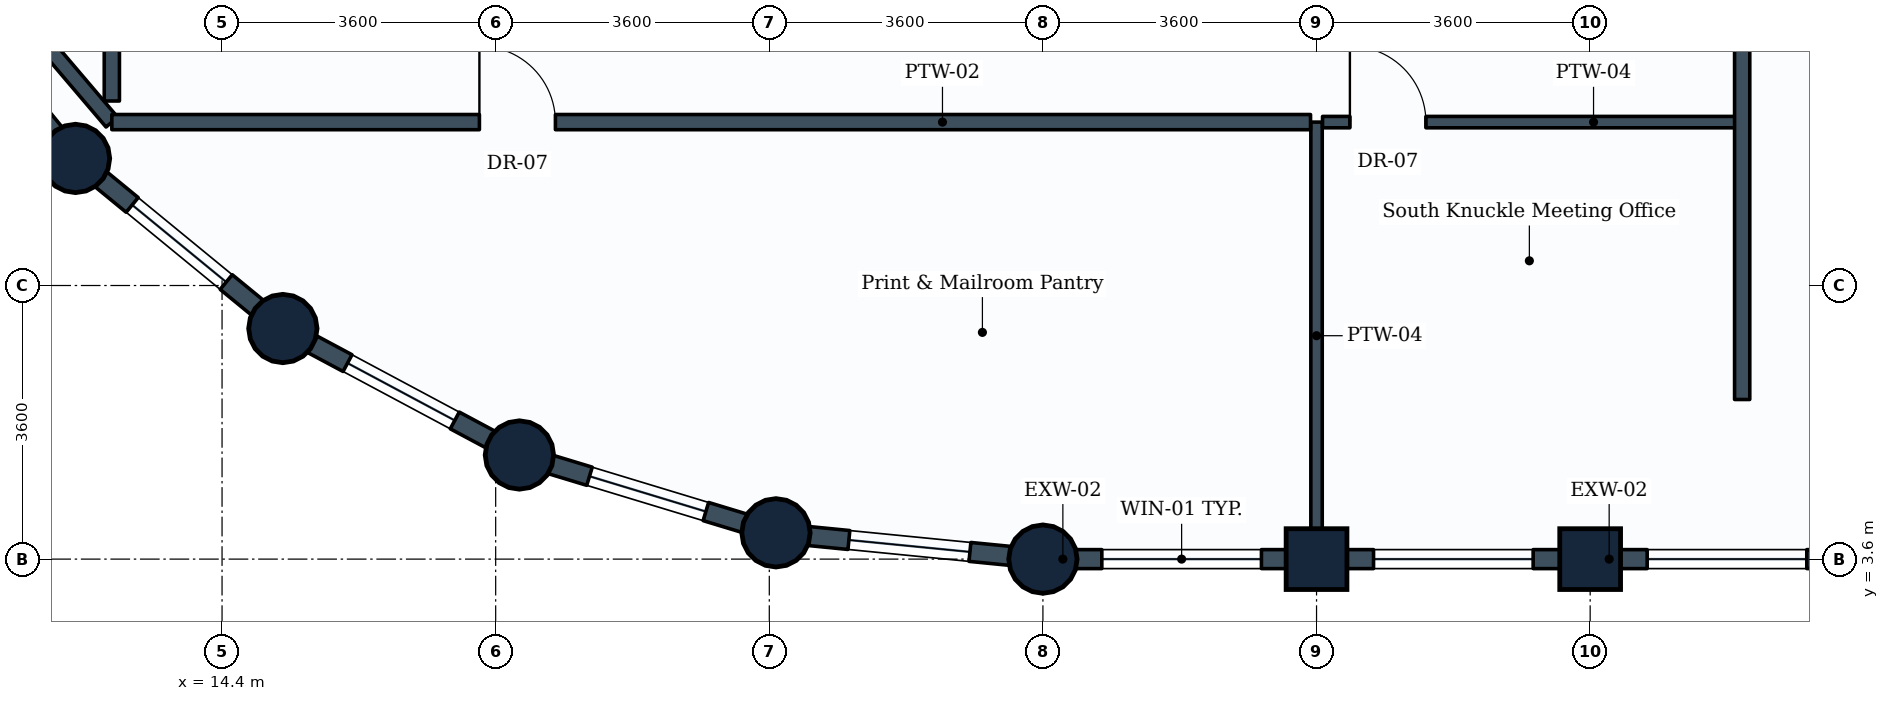
"""IFC4 building model, lengths in metres.
Left out: names, types, materials, properties, quantities, classifications, styles, units other than length and angle.
Written with IfcOpenShell. Run it as: python <this file> out.ifc"""

import sys

from ifc_helpers import new_model, si_unit, direction, frame, frame_2d, origin, origin_2d, place, context, subcontext, project, spatial, rectangle, circle, extrude, element, fill, save


model = new_model("IFC4")
c1 = context("Model", 3, precision=1e-05, world=origin(), true_north=direction((0.0, 1.0)))
c2 = subcontext(c1, "Body", "Model", "MODEL_VIEW")
j1 = project(units=[si_unit("LENGTHUNIT", "METRE"), si_unit("PLANEANGLEUNIT", "RADIAN")], contexts=[c1])
p1 = place(None, origin())
s1 = spatial("IfcSite", under=j1, at=p1, CompositionType="ELEMENT")
p2 = place(p1, origin())
s2 = spatial("IfcBuilding", under=s1, at=p2, CompositionType="ELEMENT")
p3 = place(p2, frame((0.0, 0.0, 277.4)))
s3 = spatial("IfcBuildingStorey", under=s2, at=p3, CompositionType="ELEMENT", Elevation=277.4)
for number, where, z_axis, x_axis in (
    (1, (12.472, 8.872, 0.0), (0.0, 0.0, 1.0), (1.0, 0.0, 0.0)),
    (2, (15.2, 6.634, 0.0), (0.0, 0.0, 1.0), (1.0, 0.0, 0.0)),
    (3, (18.312, 4.97, 0.0), (0.0, 0.0, 1.0), (1.0, 0.0, 0.0)),
    (4, (21.688, 3.946, 0.0), (0.0, 0.0, 1.0), (1.0, 0.0, 0.0)),
    (5, (25.2, 3.6, 0.0), (0.0, 0.0, 1.0), (1.0, 0.0, 0.0)),
):
    element("IfcColumn", number, at=place(p3, frame(where, z_axis=z_axis, x_axis=x_axis)), inside=s3, PredefinedType="COLUMN", context=c2, shape_type="SweptSolid", body=[
        extrude(circle(Radius=0.45, at=origin_2d()), origin(), (0.0, 0.0, 1.0), 3.6),
    ])
for number, where, z_axis, x_axis in (
    (6, (28.8, 3.6, 0.0), (0.0, 0.0, 1.0), (1.0, 0.0, 0.0)),
    (7, (32.4, 3.6, 0.0), (0.0, 0.0, 1.0), (1.0, 0.0, 0.0)),
):
    element("IfcColumn", number, at=place(p3, frame(where, z_axis=z_axis, x_axis=x_axis)), inside=s3, PredefinedType="COLUMN", context=c2, shape_type="SweptSolid", body=[
        extrude(rectangle(XDim=0.8, YDim=0.8, at=origin_2d()), origin(), (0.0, 0.0, 1.0), 3.6),
    ])
p4 = place(p3, frame((28.8, 3.6, 0.0), z_axis=(0.0, 0.0, 1.0), x_axis=(-1.0, 0.0, 0.0)))
e8 = element("IfcWall", 8, at=p4, inside=s3, PredefinedType="STANDARD", context=c2, shape_type="SweptSolid", body=[
    extrude(rectangle(XDim=3.6, YDim=0.25, at=frame_2d((1.8, 0.0))), origin(), (0.0, 0.0, 1.0), 2.83),
])
p5 = place(p4, frame((0.725, 0.0, 0.85)))
e9 = element("IfcOpeningElement", 9, at=p5, cuts=e8, PredefinedType="OPENING", context=c2, shape_type="SweptSolid", body=[
    extrude(rectangle(XDim=2.1, YDim=1.35, at=frame_2d((1.05, 0.675))), frame((0.0, 0.135, 0.0), z_axis=(0.0, -1.0, 0.0), x_axis=(1.0, 0.0, 0.0)), (0.0, 0.0, 1.0), 0.27),
])
p6 = place(p3, frame((32.4, 3.6, 0.0), z_axis=(0.0, 0.0, 1.0), x_axis=(-1.0, 0.0, 0.0)))
e10 = element("IfcWall", 10, at=p6, inside=s3, PredefinedType="STANDARD", context=c2, shape_type="SweptSolid", body=[
    extrude(rectangle(XDim=3.6, YDim=0.25, at=frame_2d((1.8, 0.0))), origin(), (0.0, 0.0, 1.0), 2.83),
])
p7 = place(p6, frame((0.75, 0.0, 0.85)))
e11 = element("IfcOpeningElement", 11, at=p7, cuts=e10, PredefinedType="OPENING", context=c2, shape_type="SweptSolid", body=[
    extrude(rectangle(XDim=2.1, YDim=1.35, at=frame_2d((1.05, 0.675))), frame((0.0, 0.135, 0.0), z_axis=(0.0, -1.0, 0.0), x_axis=(1.0, 0.0, 0.0)), (0.0, 0.0, 1.0), 0.27),
])
p8 = place(p3, frame((36.0, 3.6, 0.0), z_axis=(0.0, 0.0, 1.0), x_axis=(-1.0, 0.0, 0.0)))
e12 = element("IfcWall", 12, at=p8, inside=s3, PredefinedType="STANDARD", context=c2, shape_type="SweptSolid", body=[
    extrude(rectangle(XDim=3.6, YDim=0.25, at=frame_2d((1.8, 0.0))), origin(), (0.0, 0.0, 1.0), 2.83),
])
p9 = place(p8, frame((0.75, 0.0, 0.85)))
e13 = element("IfcOpeningElement", 13, at=p9, cuts=e12, PredefinedType="OPENING", context=c2, shape_type="SweptSolid", body=[
    extrude(rectangle(XDim=2.1, YDim=1.35, at=frame_2d((1.05, 0.675))), frame((0.0, 0.135, 0.0), z_axis=(0.0, -1.0, 0.0), x_axis=(1.0, 0.0, 0.0)), (0.0, 0.0, 1.0), 0.27),
])
p10 = place(p3, frame((12.472, 8.872, 0.0), z_axis=(0.0, 0.0, 1.0), x_axis=(-0.634258295121, 0.773121216285, 0.0)))
e14 = element("IfcWall", 14, at=p10, inside=s3, PredefinedType="STANDARD", context=c2, shape_type="SweptSolid", body=[
    extrude(rectangle(XDim=3.529, YDim=0.25, at=frame_2d((1.764, 0.0))), origin(), (0.0, 0.0, 1.0), 2.83),
])
p11 = place(p10, frame((0.964, 0.0, 0.85)))
e15 = element("IfcOpeningElement", 15, at=p11, cuts=e14, PredefinedType="OPENING", context=c2, shape_type="SweptSolid", body=[
    extrude(rectangle(XDim=1.6, YDim=1.35, at=frame_2d((0.8, 0.675))), frame((0.0, 0.135, 0.0), z_axis=(0.0, -1.0, 0.0), x_axis=(1.0, 0.0, 0.0)), (0.0, 0.0, 1.0), 0.27),
])
p12 = place(p3, frame((15.2, 6.634, 0.0), z_axis=(0.0, 0.0, 1.0), x_axis=(-0.773121216285, 0.634258295121, 0.0)))
e16 = element("IfcWall", 16, at=p12, inside=s3, PredefinedType="STANDARD", context=c2, shape_type="SweptSolid", body=[
    extrude(rectangle(XDim=3.529, YDim=0.25, at=frame_2d((1.764, 0.0))), origin(), (0.0, 0.0, 1.0), 2.83),
])
p13 = place(p12, frame((0.964, 0.0, 0.85)))
e17 = element("IfcOpeningElement", 17, at=p13, cuts=e16, PredefinedType="OPENING", context=c2, shape_type="SweptSolid", body=[
    extrude(rectangle(XDim=1.6, YDim=1.35, at=frame_2d((0.8, 0.675))), frame((0.0, 0.135, 0.0), z_axis=(0.0, -1.0, 0.0), x_axis=(1.0, 0.0, 0.0)), (0.0, 0.0, 1.0), 0.27),
])
p14 = place(p3, frame((18.312, 4.97, 0.0), z_axis=(0.0, 0.0, 1.0), x_axis=(-0.881846862014, 0.471535907389, 0.0)))
e18 = element("IfcWall", 18, at=p14, inside=s3, PredefinedType="STANDARD", context=c2, shape_type="SweptSolid", body=[
    extrude(rectangle(XDim=3.529, YDim=0.25, at=frame_2d((1.765, 0.0))), origin(), (0.0, 0.0, 1.0), 2.83),
])
p15 = place(p14, frame((0.964, 0.0, 0.85)))
e19 = element("IfcOpeningElement", 19, at=p15, cuts=e18, PredefinedType="OPENING", context=c2, shape_type="SweptSolid", body=[
    extrude(rectangle(XDim=1.6, YDim=1.35, at=frame_2d((0.8, 0.675))), frame((0.0, 0.135, 0.0), z_axis=(0.0, -1.0, 0.0), x_axis=(1.0, 0.0, 0.0)), (0.0, 0.0, 1.0), 0.27),
])
p16 = place(p3, frame((21.688, 3.946, 0.0), z_axis=(0.0, 0.0, 1.0), x_axis=(-0.956953367403, 0.290241714123, 0.0)))
e20 = element("IfcWall", 20, at=p16, inside=s3, PredefinedType="STANDARD", context=c2, shape_type="SweptSolid", body=[
    extrude(rectangle(XDim=3.528, YDim=0.25, at=frame_2d((1.764, 0.0))), origin(), (0.0, 0.0, 1.0), 2.83),
])
p17 = place(p16, frame((0.964, 0.0, 0.85)))
e21 = element("IfcOpeningElement", 21, at=p17, cuts=e20, PredefinedType="OPENING", context=c2, shape_type="SweptSolid", body=[
    extrude(rectangle(XDim=1.6, YDim=1.35, at=frame_2d((0.8, 0.675))), frame((0.0, 0.135, 0.0), z_axis=(0.0, -1.0, 0.0), x_axis=(1.0, 0.0, 0.0)), (0.0, 0.0, 1.0), 0.27),
])
p18 = place(p3, frame((25.2, 3.6, 0.0), z_axis=(0.0, 0.0, 1.0), x_axis=(-0.995183369056, 0.098030923459, 0.0)))
e22 = element("IfcWall", 22, at=p18, inside=s3, PredefinedType="STANDARD", context=c2, shape_type="SweptSolid", body=[
    extrude(rectangle(XDim=3.529, YDim=0.25, at=frame_2d((1.765, 0.0))), origin(), (0.0, 0.0, 1.0), 2.83),
])
p19 = place(p18, frame((0.965, 0.0, 0.85)))
e23 = element("IfcOpeningElement", 23, at=p19, cuts=e22, PredefinedType="OPENING", context=c2, shape_type="SweptSolid", body=[
    extrude(rectangle(XDim=1.6, YDim=1.35, at=frame_2d((0.8, 0.675))), frame((0.0, 0.135, 0.0), z_axis=(0.0, -1.0, 0.0), x_axis=(1.0, 0.0, 0.0)), (0.0, 0.0, 1.0), 0.27),
])
p20 = place(p3, frame((28.8, 9.35, 0.0), z_axis=(0.0, 0.0, 1.0), x_axis=(0.0, -1.0, 0.0)))
e24 = element("IfcWall", 24, at=p20, inside=s3, PredefinedType="PARTITIONING", context=c2, shape_type="SweptSolid", body=[
    extrude(rectangle(XDim=5.621, YDim=0.15, at=frame_2d((2.811, 0.0))), origin(), (0.0, 0.0, 1.0), 3.335),
])
p21 = place(p3, frame((12.95, 9.35, 0.0), z_axis=(0.0, 0.0, 1.0), x_axis=(-0.648016103597, 0.761626633908, 0.0)))
e25 = element("IfcWall", 25, at=p21, inside=s3, PredefinedType="PARTITIONING", context=c2, shape_type="SweptSolid", body=[
    extrude(rectangle(XDim=5.319, YDim=0.2, at=frame_2d((2.659, 0.0))), origin(), (0.0, 0.0, 1.0), 2.83),
])
p22 = place(p3, frame((12.95, 9.628, 0.0), z_axis=(0.0, 0.0, 1.0), x_axis=(0.0, 1.0, 0.0)))
e26 = element("IfcWall", 26, at=p22, inside=s3, PredefinedType="PARTITIONING", context=c2, shape_type="SweptSolid", body=[
    extrude(rectangle(XDim=6.868, YDim=0.2, at=frame_2d((3.434, 0.0))), origin(), (0.0, 0.0, 1.0), 3.03),
])
p23 = place(p22, frame((3.953, 0.0, 0.0)))
e27 = element("IfcOpeningElement", 27, at=p23, cuts=e26, PredefinedType="OPENING", context=c2, shape_type="SweptSolid", body=[
    extrude(rectangle(XDim=1.0, YDim=2.1, at=frame_2d((0.5, 1.05))), frame((0.0, 0.11, 0.0), z_axis=(0.0, -1.0, 0.0), x_axis=(1.0, 0.0, 0.0)), (0.0, 0.0, 1.0), 0.22),
])
p24 = place(p3, frame((12.95, 9.35, 0.0), z_axis=(0.0, 0.0, 1.0), x_axis=(1.0, 0.0, 0.0)))
e28 = element("IfcWall", 28, at=p24, inside=s3, PredefinedType="PARTITIONING", context=c2, shape_type="SweptSolid", body=[
    extrude(rectangle(XDim=15.771, YDim=0.2, at=frame_2d((7.885, 0.0))), origin(), (0.0, 0.0, 1.0), 3.02),
])
p25 = place(p24, frame((4.836, 0.0, 0.0)))
e29 = element("IfcOpeningElement", 29, at=p25, cuts=e28, PredefinedType="OPENING", context=c2, shape_type="SweptSolid", body=[
    extrude(rectangle(XDim=1.0, YDim=2.1, at=frame_2d((0.5, 1.05))), frame((0.0, 0.11, 0.0), z_axis=(0.0, -1.0, 0.0), x_axis=(1.0, 0.0, 0.0)), (0.0, 0.0, 1.0), 0.22),
])
p26 = place(p3, frame((28.879, 9.35, 0.0), z_axis=(0.0, 0.0, 1.0), x_axis=(1.0, 0.0, 0.0)))
e30 = element("IfcWall", 30, at=p26, inside=s3, PredefinedType="PARTITIONING", context=c2, shape_type="SweptSolid", body=[
    extrude(rectangle(XDim=5.521, YDim=0.15, at=frame_2d((2.76, 0.0))), origin(), (0.0, 0.0, 1.0), 3.335),
])
p27 = place(p26, frame((0.36, 0.0, 0.0)))
e31 = element("IfcOpeningElement", 31, at=p27, cuts=e30, PredefinedType="OPENING", context=c2, shape_type="SweptSolid", body=[
    extrude(rectangle(XDim=1.0, YDim=2.1, at=frame_2d((0.5, 1.05))), frame((0.0, 0.085, 0.0), z_axis=(0.0, -1.0, 0.0), x_axis=(1.0, 0.0, 0.0)), (0.0, 0.0, 1.0), 0.17),
])
p28 = place(p3, frame((34.4, 5.7, 0.0), z_axis=(0.0, 0.0, 1.0), x_axis=(0.0, 1.0, 0.0)))
e32 = element("IfcWall", 32, at=p28, inside=s3, PredefinedType="PARTITIONING", context=c2, shape_type="SweptSolid", body=[
    extrude(rectangle(XDim=12.15, YDim=0.2, at=frame_2d((6.075, 0.0))), origin(), (0.0, 0.0, 1.0), 3.03),
])
p29 = place(p5, origin())
e33 = element("IfcWindow", 33, at=p29, inside=s3, PartitioningType="SINGLE_PANEL", PredefinedType="WINDOW", context=c2, shape_type="SweptSolid", body=[
    extrude(rectangle(XDim=2.1, YDim=1.35, at=frame_2d((1.05, 0.675))), frame((0.0, 0.03, 0.0), z_axis=(0.0, -1.0, 0.0), x_axis=(1.0, 0.0, 0.0)), (0.0, 0.0, 1.0), 0.06),
])
fill(e9, e33)
p30 = place(p7, origin())
e34 = element("IfcWindow", 34, at=p30, inside=s3, PartitioningType="SINGLE_PANEL", PredefinedType="WINDOW", context=c2, shape_type="SweptSolid", body=[
    extrude(rectangle(XDim=2.1, YDim=1.35, at=frame_2d((1.05, 0.675))), frame((0.0, 0.03, 0.0), z_axis=(0.0, -1.0, 0.0), x_axis=(1.0, 0.0, 0.0)), (0.0, 0.0, 1.0), 0.06),
])
fill(e11, e34)
p31 = place(p9, origin())
e35 = element("IfcWindow", 35, at=p31, inside=s3, PartitioningType="SINGLE_PANEL", PredefinedType="WINDOW", context=c2, shape_type="SweptSolid", body=[
    extrude(rectangle(XDim=2.1, YDim=1.35, at=frame_2d((1.05, 0.675))), frame((0.0, 0.03, 0.0), z_axis=(0.0, -1.0, 0.0), x_axis=(1.0, 0.0, 0.0)), (0.0, 0.0, 1.0), 0.06),
])
fill(e13, e35)
p32 = place(p13, origin())
e36 = element("IfcWindow", 36, at=p32, inside=s3, PartitioningType="SINGLE_PANEL", PredefinedType="WINDOW", context=c2, shape_type="SweptSolid", body=[
    extrude(rectangle(XDim=1.6, YDim=1.35, at=frame_2d((0.8, 0.675))), frame((0.0, 0.03, 0.0), z_axis=(0.0, -1.0, 0.0), x_axis=(1.0, 0.0, 0.0)), (0.0, 0.0, 1.0), 0.06),
])
fill(e17, e36)
p33 = place(p15, origin())
e37 = element("IfcWindow", 37, at=p33, inside=s3, PartitioningType="SINGLE_PANEL", PredefinedType="WINDOW", context=c2, shape_type="SweptSolid", body=[
    extrude(rectangle(XDim=1.6, YDim=1.35, at=frame_2d((0.8, 0.675))), frame((0.0, 0.03, 0.0), z_axis=(0.0, -1.0, 0.0), x_axis=(1.0, 0.0, 0.0)), (0.0, 0.0, 1.0), 0.06),
])
fill(e19, e37)
p34 = place(p17, origin())
e38 = element("IfcWindow", 38, at=p34, inside=s3, PartitioningType="SINGLE_PANEL", PredefinedType="WINDOW", context=c2, shape_type="SweptSolid", body=[
    extrude(rectangle(XDim=1.6, YDim=1.35, at=frame_2d((0.8, 0.675))), frame((0.0, 0.03, 0.0), z_axis=(0.0, -1.0, 0.0), x_axis=(1.0, 0.0, 0.0)), (0.0, 0.0, 1.0), 0.06),
])
fill(e21, e38)
p35 = place(p19, origin())
e39 = element("IfcWindow", 39, at=p35, inside=s3, PartitioningType="SINGLE_PANEL", PredefinedType="WINDOW", context=c2, shape_type="SweptSolid", body=[
    extrude(rectangle(XDim=1.6, YDim=1.35, at=frame_2d((0.8, 0.675))), frame((0.0, 0.03, 0.0), z_axis=(0.0, -1.0, 0.0), x_axis=(1.0, 0.0, 0.0)), (0.0, 0.0, 1.0), 0.06),
])
fill(e23, e39)
p36 = place(p25, origin())
e40 = element("IfcDoor", 40, at=p36, inside=s3, OperationType="SINGLE_SWING_LEFT", PredefinedType="DOOR", context=c2, shape_type="SweptSolid", body=[
    extrude(rectangle(XDim=1.0, YDim=2.1, at=frame_2d((0.5, 1.05))), frame((0.0, 0.025, 0.0), z_axis=(0.0, -1.0, 0.0), x_axis=(1.0, 0.0, 0.0)), (0.0, 0.0, 1.0), 0.05),
])
fill(e29, e40)
p37 = place(p27, origin())
e41 = element("IfcDoor", 41, at=p37, inside=s3, OperationType="SINGLE_SWING_LEFT", PredefinedType="DOOR", context=c2, shape_type="SweptSolid", body=[
    extrude(rectangle(XDim=1.0, YDim=2.1, at=frame_2d((0.5, 1.05))), frame((0.0, 0.025, 0.0), z_axis=(0.0, -1.0, 0.0), x_axis=(1.0, 0.0, 0.0)), (0.0, 0.0, 1.0), 0.05),
])
fill(e31, e41)
save(model, sys.argv[1])
